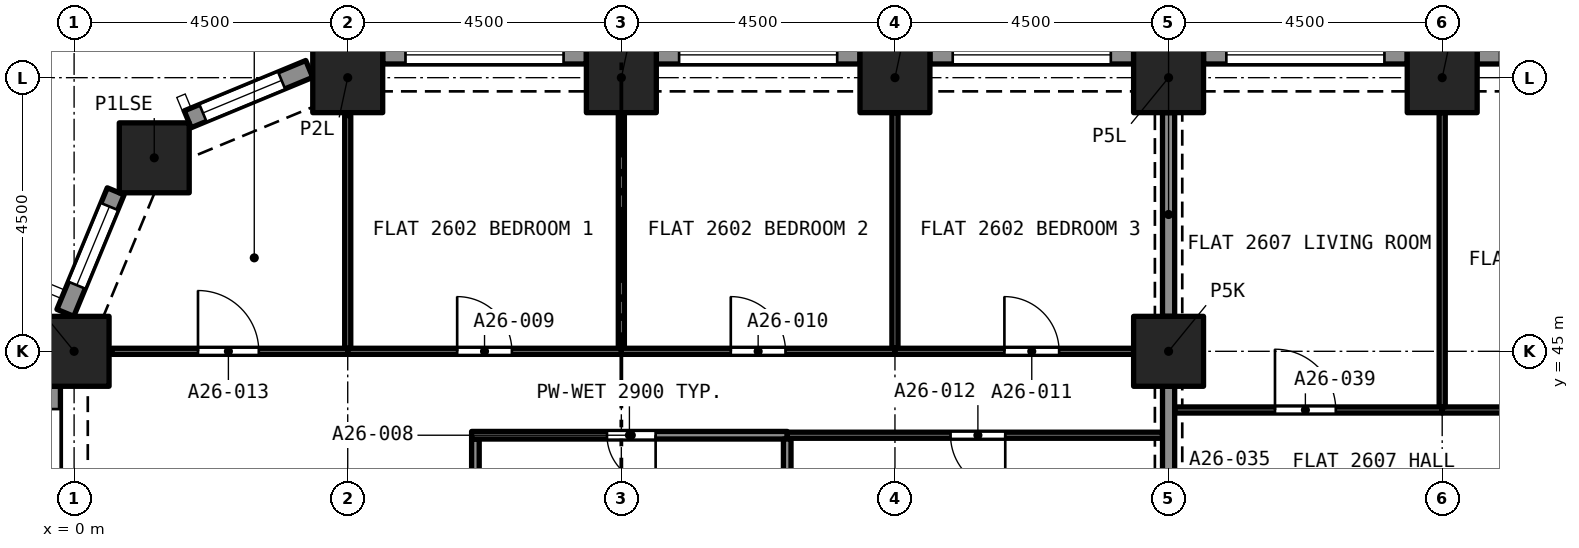
"""IFC4 building model, lengths in metres.
Left out: names, types, materials, properties, quantities, classifications, styles, units other than length and angle.
Written with IfcOpenShell. Run it as: python <this file> out.ifc"""

import sys

from ifc_helpers import new_model, si_unit, direction, frame, frame_2d, origin, origin_2d, place, context, subcontext, project, spatial, rectangle, extrude, element, fill, save


model = new_model("IFC4")
c1 = context("Model", 3, precision=1e-05, world=origin(), true_north=direction((0.0, 1.0)))
c2 = subcontext(c1, "Body", "Model", "MODEL_VIEW")
j1 = project(units=[si_unit("LENGTHUNIT", "METRE"), si_unit("PLANEANGLEUNIT", "RADIAN")], contexts=[c1])
p1 = place(None, origin())
s1 = spatial("IfcSite", under=j1, at=p1, CompositionType="ELEMENT")
p2 = place(p1, origin())
s2 = spatial("IfcBuilding", under=s1, at=p2, CompositionType="ELEMENT")
p3 = place(p2, frame((0.0, 0.0, 96.0)))
s3 = spatial("IfcBuildingStorey", under=s2, at=p3, CompositionType="ELEMENT", Elevation=96.0)
for number, where, z_axis, x_axis in (
    (1, (0.0, 45.0, 0.0), (0.0, 0.0, 1.0), (1.0, 0.0, 0.0)),
    (2, (18.0, 45.0, 0.0), (0.0, 0.0, 1.0), (1.0, 0.0, 0.0)),
    (3, (1.318, 48.182, 0.0), (0.0, 0.0, 1.0), (1.0, 0.0, 0.0)),
    (4, (4.5, 49.5, 0.0), (0.0, 0.0, 1.0), (1.0, 0.0, 0.0)),
    (5, (9.0, 49.5, 0.0), (0.0, 0.0, 1.0), (1.0, 0.0, 0.0)),
    (6, (13.5, 49.5, 0.0), (0.0, 0.0, 1.0), (1.0, 0.0, 0.0)),
    (7, (18.0, 49.5, 0.0), (0.0, 0.0, 1.0), (1.0, 0.0, 0.0)),
    (8, (22.5, 49.5, 0.0), (0.0, 0.0, 1.0), (1.0, 0.0, 0.0)),
):
    element("IfcColumn", number, at=place(p3, frame(where, z_axis=z_axis, x_axis=x_axis)), inside=s3, PredefinedType="COLUMN", context=c2, shape_type="SweptSolid", body=[
        extrude(rectangle(XDim=1.15, YDim=1.15, at=origin_2d()), origin(), (0.0, 0.0, 1.0), 3.2),
    ])
p4 = place(p3, frame((23.075, 49.875, 0.0), z_axis=(0.0, 0.0, 1.0), x_axis=(1.0, 0.0, 0.0)))
e9 = element("IfcWall", 9, at=p4, inside=s3, PredefinedType="SOLIDWALL", context=c2, shape_type="SweptSolid", body=[
    extrude(rectangle(XDim=3.35, YDim=0.3, at=frame_2d((1.675, 0.0))), origin(), (0.0, 0.0, 1.0), 3.2),
])
p5 = place(p4, frame((0.375, 0.0, 0.45)))
e10 = element("IfcOpeningElement", 10, at=p5, cuts=e9, PredefinedType="OPENING", context=c2, shape_type="SweptSolid", body=[
    extrude(rectangle(XDim=2.6, YDim=1.95, at=frame_2d((1.3, 0.975))), frame((0.0, 0.16, 0.0), z_axis=(0.0, -1.0, 0.0), x_axis=(1.0, 0.0, 0.0)), (0.0, 0.0, 1.0), 0.32),
])
p6 = place(p3, frame((18.575, 49.875, 0.0), z_axis=(0.0, 0.0, 1.0), x_axis=(1.0, 0.0, 0.0)))
e11 = element("IfcWall", 11, at=p6, inside=s3, PredefinedType="SOLIDWALL", context=c2, shape_type="SweptSolid", body=[
    extrude(rectangle(XDim=3.35, YDim=0.3, at=frame_2d((1.675, 0.0))), origin(), (0.0, 0.0, 1.0), 3.2),
])
p7 = place(p6, frame((0.375, 0.0, 0.45)))
e12 = element("IfcOpeningElement", 12, at=p7, cuts=e11, PredefinedType="OPENING", context=c2, shape_type="SweptSolid", body=[
    extrude(rectangle(XDim=2.6, YDim=1.95, at=frame_2d((1.3, 0.975))), frame((0.0, 0.16, 0.0), z_axis=(0.0, -1.0, 0.0), x_axis=(1.0, 0.0, 0.0)), (0.0, 0.0, 1.0), 0.32),
])
p8 = place(p3, frame((14.075, 49.875, 0.0), z_axis=(0.0, 0.0, 1.0), x_axis=(1.0, 0.0, 0.0)))
e13 = element("IfcWall", 13, at=p8, inside=s3, PredefinedType="SOLIDWALL", context=c2, shape_type="SweptSolid", body=[
    extrude(rectangle(XDim=3.35, YDim=0.3, at=frame_2d((1.675, 0.0))), origin(), (0.0, 0.0, 1.0), 3.2),
])
p9 = place(p8, frame((0.375, 0.0, 0.45)))
e14 = element("IfcOpeningElement", 14, at=p9, cuts=e13, PredefinedType="OPENING", context=c2, shape_type="SweptSolid", body=[
    extrude(rectangle(XDim=2.6, YDim=1.95, at=frame_2d((1.3, 0.975))), frame((0.0, 0.16, 0.0), z_axis=(0.0, -1.0, 0.0), x_axis=(1.0, 0.0, 0.0)), (0.0, 0.0, 1.0), 0.32),
])
p10 = place(p3, frame((9.575, 49.875, 0.0), z_axis=(0.0, 0.0, 1.0), x_axis=(1.0, 0.0, 0.0)))
e15 = element("IfcWall", 15, at=p10, inside=s3, PredefinedType="SOLIDWALL", context=c2, shape_type="SweptSolid", body=[
    extrude(rectangle(XDim=3.35, YDim=0.3, at=frame_2d((1.675, 0.0))), origin(), (0.0, 0.0, 1.0), 3.2),
])
p11 = place(p10, frame((0.375, 0.0, 0.45)))
e16 = element("IfcOpeningElement", 16, at=p11, cuts=e15, PredefinedType="OPENING", context=c2, shape_type="SweptSolid", body=[
    extrude(rectangle(XDim=2.6, YDim=1.95, at=frame_2d((1.3, 0.975))), frame((0.0, 0.16, 0.0), z_axis=(0.0, -1.0, 0.0), x_axis=(1.0, 0.0, 0.0)), (0.0, 0.0, 1.0), 0.32),
])
p12 = place(p3, frame((5.075, 49.875, 0.0), z_axis=(0.0, 0.0, 1.0), x_axis=(1.0, 0.0, 0.0)))
e17 = element("IfcWall", 17, at=p12, inside=s3, PredefinedType="SOLIDWALL", context=c2, shape_type="SweptSolid", body=[
    extrude(rectangle(XDim=3.35, YDim=0.3, at=frame_2d((1.675, 0.0))), origin(), (0.0, 0.0, 1.0), 3.2),
])
p13 = place(p12, frame((0.375, 0.0, 0.45)))
e18 = element("IfcOpeningElement", 18, at=p13, cuts=e17, PredefinedType="OPENING", context=c2, shape_type="SweptSolid", body=[
    extrude(rectangle(XDim=2.6, YDim=1.95, at=frame_2d((1.3, 0.975))), frame((0.0, 0.16, 0.0), z_axis=(0.0, -1.0, 0.0), x_axis=(1.0, 0.0, 0.0)), (0.0, 0.0, 1.0), 0.32),
])
p14 = place(p3, frame((1.869, 48.816, 0.0), z_axis=(0.0, 0.0, 1.0), x_axis=(0.923862802911, 0.382723818695, 0.0)))
e19 = element("IfcWall", 19, at=p14, inside=s3, PredefinedType="SOLIDWALL", context=c2, shape_type="SweptSolid", body=[
    extrude(rectangle(XDim=2.164, YDim=0.3, at=frame_2d((1.082, 0.0))), origin(), (0.0, 0.0, 1.0), 3.2),
])
p15 = place(p14, frame((0.271, 0.0, 0.45)))
e20 = element("IfcOpeningElement", 20, at=p15, cuts=e19, PredefinedType="OPENING", context=c2, shape_type="SweptSolid", body=[
    extrude(rectangle(XDim=1.4, YDim=1.95, at=frame_2d((0.7, 0.975))), frame((0.0, 0.16, 0.0), z_axis=(0.0, -1.0, 0.0), x_axis=(1.0, 0.0, 0.0)), (0.0, 0.0, 1.0), 0.32),
])
p16 = place(p3, frame((-0.144, 45.632, 0.0), z_axis=(0.0, 0.0, 1.0), x_axis=(0.382723818695, 0.923862802911, 0.0)))
e21 = element("IfcWall", 21, at=p16, inside=s3, PredefinedType="SOLIDWALL", context=c2, shape_type="SweptSolid", body=[
    extrude(rectangle(XDim=2.164, YDim=0.3, at=frame_2d((1.082, 0.0))), origin(), (0.0, 0.0, 1.0), 3.2),
])
p17 = place(p16, frame((0.493, 0.0, 0.45)))
e22 = element("IfcOpeningElement", 22, at=p17, cuts=e21, PredefinedType="OPENING", context=c2, shape_type="SweptSolid", body=[
    extrude(rectangle(XDim=1.4, YDim=1.95, at=frame_2d((0.7, 0.975))), frame((0.0, 0.16, 0.0), z_axis=(0.0, -1.0, 0.0), x_axis=(1.0, 0.0, 0.0)), (0.0, 0.0, 1.0), 0.32),
])
p18 = place(p3, frame((-0.375, 41.075, 0.0), z_axis=(0.0, 0.0, 1.0), x_axis=(0.0, 1.0, 0.0)))
e23 = element("IfcWall", 23, at=p18, inside=s3, PredefinedType="SOLIDWALL", context=c2, shape_type="SweptSolid", body=[
    extrude(rectangle(XDim=3.35, YDim=0.3, at=frame_2d((1.675, 0.0))), origin(), (0.0, 0.0, 1.0), 3.2),
])
p19 = place(p18, frame((0.375, 0.0, 0.45)))
e24 = element("IfcOpeningElement", 24, at=p19, cuts=e23, PredefinedType="OPENING", context=c2, shape_type="SweptSolid", body=[
    extrude(rectangle(XDim=2.6, YDim=1.95, at=frame_2d((1.3, 0.975))), frame((0.0, 0.16, 0.0), z_axis=(0.0, -1.0, 0.0), x_axis=(1.0, 0.0, 0.0)), (0.0, 0.0, 1.0), 0.32),
])
p20 = place(p3, frame((6.6, 40.35, 0.0), z_axis=(0.0, 0.0, 1.0), x_axis=(0.0, 1.0, 0.0)))
e25 = element("IfcWall", 25, at=p20, inside=s3, PredefinedType="PARTITIONING", context=c2, shape_type="SweptSolid", body=[
    extrude(rectangle(XDim=3.208, YDim=0.125, at=frame_2d((1.604, 0.0))), origin(), (0.0, 0.0, 1.0), 2.9),
])
p21 = place(p3, frame((11.728, 43.62, 0.0), z_axis=(0.0, 0.0, 1.0), x_axis=(-1.0, 0.0, 0.0)))
e26 = element("IfcWall", 26, at=p21, inside=s3, PredefinedType="PARTITIONING", context=c2, shape_type="SweptSolid", body=[
    extrude(rectangle(XDim=5.19, YDim=0.125, at=frame_2d((2.595, 0.0))), origin(), (0.0, 0.0, 1.0), 2.9),
])
p22 = place(p21, frame((2.164, 0.0, 0.0)))
e27 = element("IfcOpeningElement", 27, at=p22, cuts=e26, PredefinedType="OPENING", context=c2, shape_type="SweptSolid", body=[
    extrude(rectangle(XDim=0.8, YDim=2.1, at=frame_2d((0.4, 1.05))), frame((0.0, 0.073, 0.0), z_axis=(0.0, -1.0, 0.0), x_axis=(1.0, 0.0, 0.0)), (0.0, 0.0, 1.0), 0.145),
])
p23 = place(p3, frame((11.728, 40.35, 0.0), z_axis=(0.0, 0.0, 1.0), x_axis=(0.0, 1.0, 0.0)))
e28 = element("IfcWall", 28, at=p23, inside=s3, PredefinedType="PARTITIONING", context=c2, shape_type="SweptSolid", body=[
    extrude(rectangle(XDim=3.208, YDim=0.125, at=frame_2d((1.604, 0.0))), origin(), (0.0, 0.0, 1.0), 2.9),
])
p24 = place(p3, frame((9.0, 45.05, 0.0), z_axis=(0.0, 0.0, 1.0), x_axis=(0.0, 1.0, 0.0)))
e29 = element("IfcWall", 29, at=p24, inside=s3, PredefinedType="PARTITIONING", context=c2, shape_type="SweptSolid", body=[
    extrude(rectangle(XDim=3.875, YDim=0.1, at=frame_2d((1.938, 0.0))), origin(), (0.0, 0.0, 1.0), 2.9),
])
p25 = place(p3, frame((4.5, 45.0, 0.0), z_axis=(0.0, 0.0, 1.0), x_axis=(1.0, 0.0, 0.0)))
e30 = element("IfcWall", 30, at=p25, inside=s3, PredefinedType="PARTITIONING", context=c2, shape_type="SweptSolid", body=[
    extrude(rectangle(XDim=4.5, YDim=0.1, at=frame_2d((2.25, 0.0))), origin(), (0.0, 0.0, 1.0), 2.9),
])
p26 = place(p25, frame((1.8, 0.0, 0.0)))
e31 = element("IfcOpeningElement", 31, at=p26, cuts=e30, PredefinedType="OPENING", context=c2, shape_type="SweptSolid", body=[
    extrude(rectangle(XDim=0.9, YDim=2.1, at=frame_2d((0.45, 1.05))), frame((0.0, 0.06, 0.0), z_axis=(0.0, -1.0, 0.0), x_axis=(1.0, 0.0, 0.0)), (0.0, 0.0, 1.0), 0.12),
])
p27 = place(p3, frame((4.5, 45.05, 0.0), z_axis=(0.0, 0.0, 1.0), x_axis=(0.0, 1.0, 0.0)))
e32 = element("IfcWall", 32, at=p27, inside=s3, PredefinedType="PARTITIONING", context=c2, shape_type="SweptSolid", body=[
    extrude(rectangle(XDim=3.828, YDim=0.1, at=frame_2d((1.914, 0.0))), origin(), (0.0, 0.0, 1.0), 2.9),
])
p28 = place(p3, frame((13.5, 45.05, 0.0), z_axis=(0.0, 0.0, 1.0), x_axis=(0.0, 1.0, 0.0)))
e33 = element("IfcWall", 33, at=p28, inside=s3, PredefinedType="PARTITIONING", context=c2, shape_type="SweptSolid", body=[
    extrude(rectangle(XDim=3.875, YDim=0.1, at=frame_2d((1.938, 0.0))), origin(), (0.0, 0.0, 1.0), 2.9),
])
p29 = place(p3, frame((9.0, 45.0, 0.0), z_axis=(0.0, 0.0, 1.0), x_axis=(1.0, 0.0, 0.0)))
e34 = element("IfcWall", 34, at=p29, inside=s3, PredefinedType="PARTITIONING", context=c2, shape_type="SweptSolid", body=[
    extrude(rectangle(XDim=4.5, YDim=0.1, at=frame_2d((2.25, 0.0))), origin(), (0.0, 0.0, 1.0), 2.9),
])
p30 = place(p29, frame((1.8, 0.0, 0.0)))
e35 = element("IfcOpeningElement", 35, at=p30, cuts=e34, PredefinedType="OPENING", context=c2, shape_type="SweptSolid", body=[
    extrude(rectangle(XDim=0.9, YDim=2.1, at=frame_2d((0.45, 1.05))), frame((0.0, 0.06, 0.0), z_axis=(0.0, -1.0, 0.0), x_axis=(1.0, 0.0, 0.0)), (0.0, 0.0, 1.0), 0.12),
])
p31 = place(p3, frame((13.5, 45.0, 0.0), z_axis=(0.0, 0.0, 1.0), x_axis=(1.0, 0.0, 0.0)))
e36 = element("IfcWall", 36, at=p31, inside=s3, PredefinedType="PARTITIONING", context=c2, shape_type="SweptSolid", body=[
    extrude(rectangle(XDim=3.925, YDim=0.1, at=frame_2d((1.962, 0.0))), origin(), (0.0, 0.0, 1.0), 2.9),
])
p32 = place(p31, frame((1.8, 0.0, 0.0)))
e37 = element("IfcOpeningElement", 37, at=p32, cuts=e36, PredefinedType="OPENING", context=c2, shape_type="SweptSolid", body=[
    extrude(rectangle(XDim=0.9, YDim=2.1, at=frame_2d((0.45, 1.05))), frame((0.0, 0.06, 0.0), z_axis=(0.0, -1.0, 0.0), x_axis=(1.0, 0.0, 0.0)), (0.0, 0.0, 1.0), 0.12),
])
p33 = place(p3, frame((18.0, 45.575, 0.0), z_axis=(0.0, 0.0, 1.0), x_axis=(0.0, 1.0, 0.0)))
e38 = element("IfcWall", 38, at=p33, inside=s3, PredefinedType="PARTITIONING", context=c2, shape_type="SweptSolid", body=[
    extrude(rectangle(XDim=3.35, YDim=0.2, at=frame_2d((1.675, 0.0))), origin(), (0.0, 0.0, 1.0), 2.38),
])
p34 = place(p3, frame((17.9, 43.62, 0.0), z_axis=(0.0, 0.0, 1.0), x_axis=(-1.0, 0.0, 0.0)))
e39 = element("IfcWall", 39, at=p34, inside=s3, PredefinedType="PARTITIONING", context=c2, shape_type="SweptSolid", body=[
    extrude(rectangle(XDim=6.172, YDim=0.1, at=frame_2d((3.086, 0.0))), origin(), (0.0, 0.0, 1.0), 2.9),
])
p35 = place(p34, frame((2.586, 0.0, 0.0)))
e40 = element("IfcOpeningElement", 40, at=p35, cuts=e39, PredefinedType="OPENING", context=c2, shape_type="SweptSolid", body=[
    extrude(rectangle(XDim=0.9, YDim=2.1, at=frame_2d((0.45, 1.05))), frame((0.0, 0.06, 0.0), z_axis=(0.0, -1.0, 0.0), x_axis=(1.0, 0.0, 0.0)), (0.0, 0.0, 1.0), 0.12),
])
p36 = place(p3, frame((0.622, 45.0, 0.0), z_axis=(0.0, 0.0, 1.0), x_axis=(1.0, 0.0, 0.0)))
e41 = element("IfcWall", 41, at=p36, inside=s3, PredefinedType="PARTITIONING", context=c2, shape_type="SweptSolid", body=[
    extrude(rectangle(XDim=3.878, YDim=0.1, at=frame_2d((1.939, 0.0))), origin(), (0.0, 0.0, 1.0), 2.9),
])
p37 = place(p36, frame((1.415, 0.0, 0.0)))
e42 = element("IfcOpeningElement", 42, at=p37, cuts=e41, PredefinedType="OPENING", context=c2, shape_type="SweptSolid", body=[
    extrude(rectangle(XDim=1.0, YDim=2.1, at=frame_2d((0.5, 1.05))), frame((0.0, 0.06, 0.0), z_axis=(0.0, -1.0, 0.0), x_axis=(1.0, 0.0, 0.0)), (0.0, 0.0, 1.0), 0.12),
])
p38 = place(p3, frame((18.0, 41.075, 0.0), z_axis=(0.0, 0.0, 1.0), x_axis=(0.0, 1.0, 0.0)))
e43 = element("IfcWall", 43, at=p38, inside=s3, PredefinedType="PARTITIONING", context=c2, shape_type="SweptSolid", body=[
    extrude(rectangle(XDim=3.35, YDim=0.2, at=frame_2d((1.675, 0.0))), origin(), (0.0, 0.0, 1.0), 2.38),
])
p39 = place(p3, frame((22.5, 44.035, 0.0), z_axis=(0.0, 0.0, 1.0), x_axis=(1.0, 0.0, 0.0)))
e44 = element("IfcWall", 44, at=p39, inside=s3, PredefinedType="PARTITIONING", context=c2, shape_type="SweptSolid", body=[
    extrude(rectangle(XDim=4.5, YDim=0.1, at=frame_2d((2.25, 0.0))), origin(), (0.0, 0.0, 1.0), 2.75),
])
p40 = place(p39, frame((1.8, 0.0, 0.0)))
e45 = element("IfcOpeningElement", 45, at=p40, cuts=e44, PredefinedType="OPENING", context=c2, shape_type="SweptSolid", body=[
    extrude(rectangle(XDim=0.9, YDim=2.1, at=frame_2d((0.45, 1.05))), frame((0.0, 0.06, 0.0), z_axis=(0.0, -1.0, 0.0), x_axis=(1.0, 0.0, 0.0)), (0.0, 0.0, 1.0), 0.12),
])
p41 = place(p3, frame((22.5, 44.085, 0.0), z_axis=(0.0, 0.0, 1.0), x_axis=(0.0, 1.0, 0.0)))
e46 = element("IfcWall", 46, at=p41, inside=s3, PredefinedType="PARTITIONING", context=c2, shape_type="SweptSolid", body=[
    extrude(rectangle(XDim=4.84, YDim=0.1, at=frame_2d((2.42, 0.0))), origin(), (0.0, 0.0, 1.0), 2.75),
])
p42 = place(p3, frame((18.1, 44.035, 0.0), z_axis=(0.0, 0.0, 1.0), x_axis=(1.0, 0.0, 0.0)))
e47 = element("IfcWall", 47, at=p42, inside=s3, PredefinedType="PARTITIONING", context=c2, shape_type="SweptSolid", body=[
    extrude(rectangle(XDim=4.4, YDim=0.1, at=frame_2d((2.2, 0.0))), origin(), (0.0, 0.0, 1.0), 2.75),
])
p43 = place(p42, frame((1.65, 0.0, 0.0)))
e48 = element("IfcOpeningElement", 48, at=p43, cuts=e47, PredefinedType="OPENING", context=c2, shape_type="SweptSolid", body=[
    extrude(rectangle(XDim=1.0, YDim=2.1, at=frame_2d((0.5, 1.05))), frame((0.0, 0.06, 0.0), z_axis=(0.0, -1.0, 0.0), x_axis=(1.0, 0.0, 0.0)), (0.0, 0.0, 1.0), 0.12),
])
p44 = place(p7, origin())
e49 = element("IfcWindow", 49, at=p44, inside=s3, PartitioningType="SINGLE_PANEL", PredefinedType="WINDOW", context=c2, shape_type="SweptSolid", body=[
    extrude(rectangle(XDim=2.6, YDim=1.95, at=frame_2d((1.3, 0.975))), frame((0.0, 0.03, 0.0), z_axis=(0.0, -1.0, 0.0), x_axis=(1.0, 0.0, 0.0)), (0.0, 0.0, 1.0), 0.06),
])
fill(e12, e49)
p45 = place(p9, origin())
e50 = element("IfcWindow", 50, at=p45, inside=s3, PartitioningType="SINGLE_PANEL", PredefinedType="WINDOW", context=c2, shape_type="SweptSolid", body=[
    extrude(rectangle(XDim=2.6, YDim=1.95, at=frame_2d((1.3, 0.975))), frame((0.0, 0.03, 0.0), z_axis=(0.0, -1.0, 0.0), x_axis=(1.0, 0.0, 0.0)), (0.0, 0.0, 1.0), 0.06),
])
fill(e14, e50)
p46 = place(p11, origin())
e51 = element("IfcWindow", 51, at=p46, inside=s3, PartitioningType="SINGLE_PANEL", PredefinedType="WINDOW", context=c2, shape_type="SweptSolid", body=[
    extrude(rectangle(XDim=2.6, YDim=1.95, at=frame_2d((1.3, 0.975))), frame((0.0, 0.03, 0.0), z_axis=(0.0, -1.0, 0.0), x_axis=(1.0, 0.0, 0.0)), (0.0, 0.0, 1.0), 0.06),
])
fill(e16, e51)
p47 = place(p13, origin())
e52 = element("IfcWindow", 52, at=p47, inside=s3, PartitioningType="SINGLE_PANEL", PredefinedType="WINDOW", context=c2, shape_type="SweptSolid", body=[
    extrude(rectangle(XDim=2.6, YDim=1.95, at=frame_2d((1.3, 0.975))), frame((0.0, 0.03, 0.0), z_axis=(0.0, -1.0, 0.0), x_axis=(1.0, 0.0, 0.0)), (0.0, 0.0, 1.0), 0.06),
])
fill(e18, e52)
p48 = place(p15, origin())
e53 = element("IfcWindow", 53, at=p48, inside=s3, PartitioningType="SINGLE_PANEL", PredefinedType="WINDOW", context=c2, shape_type="SweptSolid", body=[
    extrude(rectangle(XDim=1.4, YDim=1.95, at=frame_2d((0.7, 0.975))), frame((0.0, 0.03, 0.0), z_axis=(0.0, -1.0, 0.0), x_axis=(1.0, 0.0, 0.0)), (0.0, 0.0, 1.0), 0.06),
])
fill(e20, e53)
p49 = place(p17, origin())
e54 = element("IfcWindow", 54, at=p49, inside=s3, PartitioningType="SINGLE_PANEL", PredefinedType="WINDOW", context=c2, shape_type="SweptSolid", body=[
    extrude(rectangle(XDim=1.4, YDim=1.95, at=frame_2d((0.7, 0.975))), frame((0.0, 0.03, 0.0), z_axis=(0.0, -1.0, 0.0), x_axis=(1.0, 0.0, 0.0)), (0.0, 0.0, 1.0), 0.06),
])
fill(e22, e54)
p50 = place(p19, origin())
e55 = element("IfcWindow", 55, at=p50, inside=s3, PartitioningType="SINGLE_PANEL", PredefinedType="WINDOW", context=c2, shape_type="SweptSolid", body=[
    extrude(rectangle(XDim=2.6, YDim=1.95, at=frame_2d((1.3, 0.975))), frame((0.0, 0.03, 0.0), z_axis=(0.0, -1.0, 0.0), x_axis=(1.0, 0.0, 0.0)), (0.0, 0.0, 1.0), 0.06),
])
fill(e24, e55)
p51 = place(p22, origin())
e56 = element("IfcDoor", 56, at=p51, inside=s3, OperationType="SINGLE_SWING_LEFT", PredefinedType="DOOR", context=c2, shape_type="SweptSolid", body=[
    extrude(rectangle(XDim=0.8, YDim=2.1, at=frame_2d((0.4, 1.05))), frame((0.0, 0.025, 0.0), z_axis=(0.0, -1.0, 0.0), x_axis=(1.0, 0.0, 0.0)), (0.0, 0.0, 1.0), 0.05),
])
fill(e27, e56)
p52 = place(p26, origin())
e57 = element("IfcDoor", 57, at=p52, inside=s3, OperationType="SINGLE_SWING_RIGHT", PredefinedType="DOOR", context=c2, shape_type="SweptSolid", body=[
    extrude(rectangle(XDim=0.9, YDim=2.1, at=frame_2d((0.45, 1.05))), frame((0.0, 0.025, 0.0), z_axis=(0.0, -1.0, 0.0), x_axis=(1.0, 0.0, 0.0)), (0.0, 0.0, 1.0), 0.05),
])
fill(e31, e57)
p53 = place(p30, origin())
e58 = element("IfcDoor", 58, at=p53, inside=s3, OperationType="SINGLE_SWING_LEFT", PredefinedType="DOOR", context=c2, shape_type="SweptSolid", body=[
    extrude(rectangle(XDim=0.9, YDim=2.1, at=frame_2d((0.45, 1.05))), frame((0.0, 0.025, 0.0), z_axis=(0.0, -1.0, 0.0), x_axis=(1.0, 0.0, 0.0)), (0.0, 0.0, 1.0), 0.05),
])
fill(e35, e58)
p54 = place(p32, origin())
e59 = element("IfcDoor", 59, at=p54, inside=s3, OperationType="SINGLE_SWING_RIGHT", PredefinedType="DOOR", context=c2, shape_type="SweptSolid", body=[
    extrude(rectangle(XDim=0.9, YDim=2.1, at=frame_2d((0.45, 1.05))), frame((0.0, 0.025, 0.0), z_axis=(0.0, -1.0, 0.0), x_axis=(1.0, 0.0, 0.0)), (0.0, 0.0, 1.0), 0.05),
])
fill(e37, e59)
p55 = place(p35, origin())
e60 = element("IfcDoor", 60, at=p55, inside=s3, OperationType="SINGLE_SWING_LEFT", PredefinedType="DOOR", context=c2, shape_type="SweptSolid", body=[
    extrude(rectangle(XDim=0.9, YDim=2.1, at=frame_2d((0.45, 1.05))), frame((0.0, 0.025, 0.0), z_axis=(0.0, -1.0, 0.0), x_axis=(1.0, 0.0, 0.0)), (0.0, 0.0, 1.0), 0.05),
])
fill(e40, e60)
p56 = place(p37, origin())
e61 = element("IfcDoor", 61, at=p56, inside=s3, OperationType="SINGLE_SWING_LEFT", PredefinedType="DOOR", context=c2, shape_type="SweptSolid", body=[
    extrude(rectangle(XDim=1.0, YDim=2.1, at=frame_2d((0.5, 1.05))), frame((0.0, 0.025, 0.0), z_axis=(0.0, -1.0, 0.0), x_axis=(1.0, 0.0, 0.0)), (0.0, 0.0, 1.0), 0.05),
])
fill(e42, e61)
p57 = place(p43, origin())
e62 = element("IfcDoor", 62, at=p57, inside=s3, OperationType="SINGLE_SWING_LEFT", PredefinedType="DOOR", context=c2, shape_type="SweptSolid", body=[
    extrude(rectangle(XDim=1.0, YDim=2.1, at=frame_2d((0.5, 1.05))), frame((0.0, 0.025, 0.0), z_axis=(0.0, -1.0, 0.0), x_axis=(1.0, 0.0, 0.0)), (0.0, 0.0, 1.0), 0.05),
])
fill(e48, e62)
save(model, sys.argv[1])
